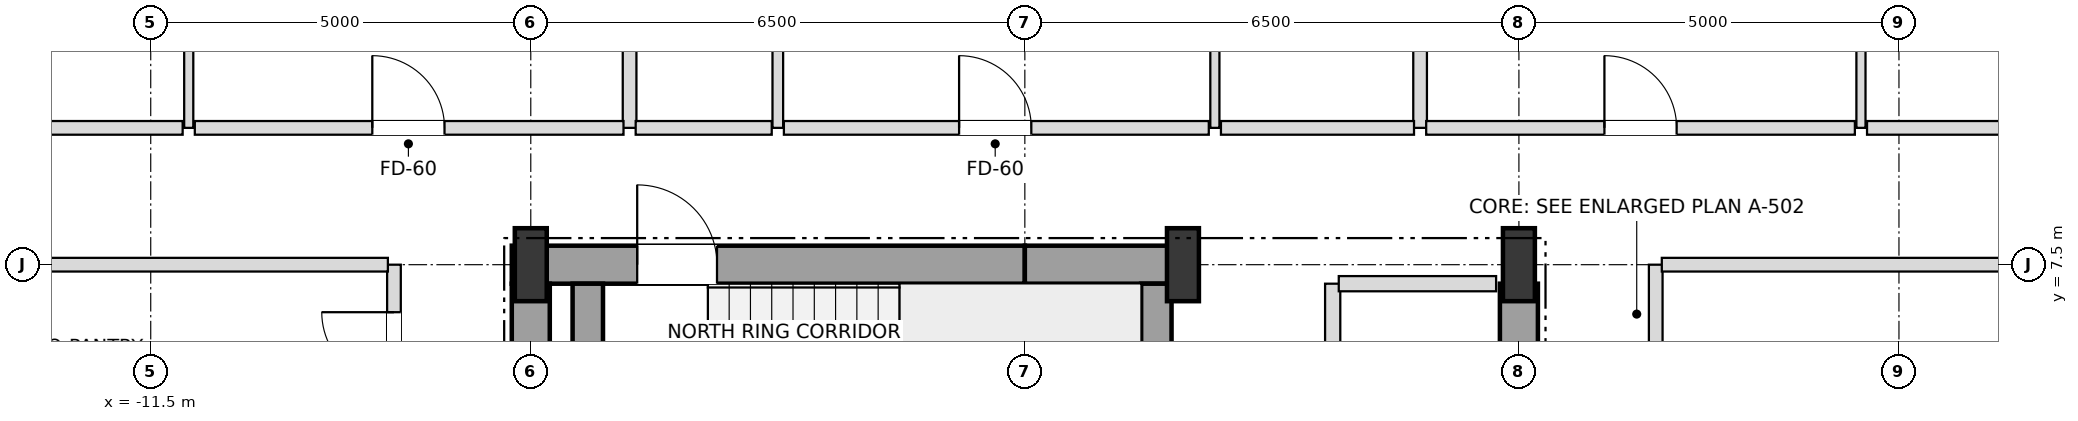
"""IFC4 building model, lengths in metres.
Left out: names, types, materials, properties, quantities, classifications, styles, units other than length and angle.
Written with IfcOpenShell. Run it as: python <this file> out.ifc"""

import sys

from ifc_helpers import new_model, si_unit, direction, frame, frame_2d, origin, origin_2d, place, context, subcontext, project, spatial, rectangle, i_section, extrude, element, fill, save


model = new_model("IFC4")
c1 = context("Model", 3, precision=1e-05, world=origin(), true_north=direction((0.0, 1.0)))
c2 = subcontext(c1, "Body", "Model", "MODEL_VIEW")
j1 = project(units=[si_unit("LENGTHUNIT", "METRE"), si_unit("PLANEANGLEUNIT", "RADIAN")], contexts=[c1])
p1 = place(None, origin())
s1 = spatial("IfcSite", under=j1, at=p1, CompositionType="ELEMENT")
p2 = place(p1, origin())
s2 = spatial("IfcBuilding", under=s1, at=p2, CompositionType="ELEMENT")
p3 = place(p2, frame((0.0, 0.0, 109.8)))
s3 = spatial("IfcBuildingStorey", under=s2, at=p3, CompositionType="ELEMENT", Elevation=109.8)
for number, where, z_axis, x_axis in (
    (1, (-6.5, 7.5, 0.0), (0.0, 0.0, 1.0), (1.0, 0.0, 0.0)),
    (2, (2.08, 7.5, 0.0), (0.0, 0.0, 1.0), (1.0, 0.0, 0.0)),
    (3, (6.5, 7.5, 0.0), (0.0, 0.0, 1.0), (1.0, 0.0, 0.0)),
):
    element("IfcColumn", number, at=place(p3, frame(where, z_axis=z_axis, x_axis=x_axis)), inside=s3, PredefinedType="COLUMN", context=c2, shape_type="SweptSolid", body=[
        extrude(i_section(OverallWidth=0.42, OverallDepth=0.96, WebThickness=0.022, FlangeThickness=0.034, at=origin_2d()), origin(), (0.0, 0.0, 1.0), 3.6),
    ])
p4 = place(p3, frame((-6.75, 7.5, 0.0), z_axis=(0.0, 0.0, 1.0), x_axis=(1.0, 0.0, 0.0)))
e4 = element("IfcWall", 4, at=p4, inside=s3, PredefinedType="SHEAR", context=c2, shape_type="SweptSolid", body=[
    extrude(rectangle(XDim=6.75, YDim=0.5, at=frame_2d((3.375, 0.0))), origin(), (0.0, 0.0, 1.0), 3.38),
])
p5 = place(p4, frame((1.65, 0.0, 0.0)))
e5 = element("IfcOpeningElement", 5, at=p5, cuts=e4, PredefinedType="OPENING", context=c2, shape_type="SweptSolid", body=[
    extrude(rectangle(XDim=1.05, YDim=2.15, at=frame_2d((0.525, 1.075))), frame((0.0, 0.26, 0.0), z_axis=(0.0, -1.0, 0.0), x_axis=(1.0, 0.0, 0.0)), (0.0, 0.0, 1.0), 0.52),
])
p6 = place(p3, frame((0.0, 7.5, 0.0), z_axis=(0.0, 0.0, 1.0), x_axis=(1.0, 0.0, 0.0)))
e6 = element("IfcWall", 6, at=p6, inside=s3, PredefinedType="SHEAR", context=c2, shape_type="SweptSolid", body=[
    extrude(rectangle(XDim=2.08, YDim=0.5, at=frame_2d((1.04, 0.0))), origin(), (0.0, 0.0, 1.0), 3.38),
])
for number, where, z_axis, x_axis in (
    (7, (-6.5, 3.95, 0.0), (0.0, 0.0, 1.0), (0.0, 1.0, 0.0)),
    (8, (6.5, 3.95, 0.0), (0.0, 0.0, 1.0), (0.0, 1.0, 0.0)),
):
    element("IfcWall", number, at=place(p3, frame(where, z_axis=z_axis, x_axis=x_axis)), inside=s3, PredefinedType="SHEAR", context=c2, shape_type="SweptSolid", body=[
        extrude(rectangle(XDim=3.3, YDim=0.5, at=frame_2d((1.65, 0.0))), origin(), (0.0, 0.0, 1.0), 3.38),
    ])
for number, where, z_axis, x_axis in (
    (9, (1.73, 3.95, 0.0), (0.0, 0.0, 1.0), (0.0, 1.0, 0.0)),
    (10, (-5.75, 3.95, 0.0), (0.0, 0.0, 1.0), (0.0, 1.0, 0.0)),
):
    element("IfcWall", number, at=place(p3, frame(where, z_axis=z_axis, x_axis=x_axis)), inside=s3, PredefinedType="SHEAR", context=c2, shape_type="SweptSolid", body=[
        extrude(rectangle(XDim=3.3, YDim=0.4, at=frame_2d((1.65, 0.0))), origin(), (0.0, 0.0, 1.0), 3.38),
    ])
p7 = place(p3, frame((-11.0, 9.3, 0.0), z_axis=(0.0, 0.0, 1.0), x_axis=(0.0, 1.0, 0.0)))
e11 = element("IfcWall", 11, at=p7, inside=s3, PredefinedType="PARTITIONING", context=c2, shape_type="SweptSolid", body=[
    extrude(rectangle(XDim=7.85, YDim=0.12, at=frame_2d((3.925, 0.0))), origin(), (0.0, 0.0, 1.0), 2.816),
])
p8 = place(p7, frame((4.219, 0.0, 0.0)))
e12 = element("IfcOpeningElement", 12, at=p8, cuts=e11, PredefinedType="OPENING", context=c2, shape_type="SweptSolid", body=[
    extrude(rectangle(XDim=0.95, YDim=2.1, at=frame_2d((0.475, 1.05))), frame((0.0, 0.07, 0.0), z_axis=(0.0, -1.0, 0.0), x_axis=(1.0, 0.0, 0.0)), (0.0, 0.0, 1.0), 0.14),
])
p9 = place(p3, frame((-8.3, -7.5, 0.0), z_axis=(0.0, 0.0, 1.0), x_axis=(0.0, 1.0, 0.0)))
e13 = element("IfcWall", 13, at=p9, inside=s3, PredefinedType="PARTITIONING", context=c2, shape_type="SweptSolid", body=[
    extrude(rectangle(XDim=15.0, YDim=0.18, at=frame_2d((7.5, 0.0))), origin(), (0.0, 0.0, 1.0), 3.38),
])
p10 = place(p9, frame((2.075, 0.0, 0.0)))
e14 = element("IfcOpeningElement", 14, at=p10, cuts=e13, PredefinedType="OPENING", context=c2, shape_type="SweptSolid", body=[
    extrude(rectangle(XDim=0.95, YDim=2.15, at=frame_2d((0.475, 1.075))), frame((0.0, 0.1, 0.0), z_axis=(0.0, -1.0, 0.0), x_axis=(1.0, 0.0, 0.0)), (0.0, 0.0, 1.0), 0.2),
])
p11 = place(p9, frame((8.475, 0.0, 0.0)))
e15 = element("IfcOpeningElement", 15, at=p11, cuts=e13, PredefinedType="OPENING", context=c2, shape_type="SweptSolid", body=[
    extrude(rectangle(XDim=0.95, YDim=2.15, at=frame_2d((0.475, 1.075))), frame((0.0, 0.1, 0.0), z_axis=(0.0, -1.0, 0.0), x_axis=(1.0, 0.0, 0.0)), (0.0, 0.0, 1.0), 0.2),
])
p12 = place(p9, frame((13.425, 0.0, 0.0)))
e16 = element("IfcOpeningElement", 16, at=p12, cuts=e13, PredefinedType="OPENING", context=c2, shape_type="SweptSolid", body=[
    extrude(rectangle(XDim=0.95, YDim=2.15, at=frame_2d((0.475, 1.075))), frame((0.0, 0.1, 0.0), z_axis=(0.0, -1.0, 0.0), x_axis=(1.0, 0.0, 0.0)), (0.0, 0.0, 1.0), 0.2),
])
p13 = place(p3, frame((-5.2, 9.3, 0.0), z_axis=(0.0, 0.0, 1.0), x_axis=(0.0, 1.0, 0.0)))
e17 = element("IfcWall", 17, at=p13, inside=s3, PredefinedType="PARTITIONING", context=c2, shape_type="SweptSolid", body=[
    extrude(rectangle(XDim=13.85, YDim=0.18, at=frame_2d((6.925, 0.0))), origin(), (0.0, 0.0, 1.0), 2.816),
])
p14 = place(p3, frame((-3.25, 9.3, 0.0), z_axis=(0.0, 0.0, 1.0), x_axis=(0.0, 1.0, 0.0)))
e18 = element("IfcWall", 18, at=p14, inside=s3, PredefinedType="PARTITIONING", context=c2, shape_type="SweptSolid", body=[
    extrude(rectangle(XDim=7.85, YDim=0.14, at=frame_2d((3.925, 0.0))), origin(), (0.0, 0.0, 1.0), 3.38),
])
p15 = place(p14, frame((3.47, 0.0, 0.0)))
e19 = element("IfcOpeningElement", 19, at=p15, cuts=e18, PredefinedType="OPENING", context=c2, shape_type="SweptSolid", body=[
    extrude(rectangle(XDim=0.9, YDim=2.1, at=frame_2d((0.45, 1.05))), frame((0.0, 0.08, 0.0), z_axis=(0.0, -1.0, 0.0), x_axis=(1.0, 0.0, 0.0)), (0.0, 0.0, 1.0), 0.16),
])
p16 = place(p3, frame((2.5, 9.3, 0.0), z_axis=(0.0, 0.0, 1.0), x_axis=(0.0, 1.0, 0.0)))
e20 = element("IfcWall", 20, at=p16, inside=s3, PredefinedType="PARTITIONING", context=c2, shape_type="SweptSolid", body=[
    extrude(rectangle(XDim=7.85, YDim=0.12, at=frame_2d((3.925, 0.0))), origin(), (0.0, 0.0, 1.0), 3.38),
])
p17 = place(p16, frame((3.445, 0.0, 0.0)))
e21 = element("IfcOpeningElement", 21, at=p17, cuts=e20, PredefinedType="OPENING", context=c2, shape_type="SweptSolid", body=[
    extrude(rectangle(XDim=0.95, YDim=2.1, at=frame_2d((0.475, 1.05))), frame((0.0, 0.07, 0.0), z_axis=(0.0, -1.0, 0.0), x_axis=(1.0, 0.0, 0.0)), (0.0, 0.0, 1.0), 0.14),
])
p18 = place(p3, frame((4.05, 4.2, 0.0), z_axis=(0.0, 0.0, 1.0), x_axis=(0.0, 1.0, 0.0)))
e22 = element("IfcWall", 22, at=p18, inside=s3, PredefinedType="SOLIDWALL", context=c2, shape_type="SweptSolid", body=[
    extrude(rectangle(XDim=3.05, YDim=0.2, at=frame_2d((1.525, 0.0))), origin(), (0.0, 0.0, 1.0), 3.38),
])
p19 = place(p18, frame((0.975, 0.0, 0.0)))
e23 = element("IfcOpeningElement", 23, at=p19, cuts=e22, PredefinedType="OPENING", context=c2, shape_type="SweptSolid", body=[
    extrude(rectangle(XDim=0.95, YDim=2.15, at=frame_2d((0.475, 1.075))), frame((0.0, 0.11, 0.0), z_axis=(0.0, -1.0, 0.0), x_axis=(1.0, 0.0, 0.0)), (0.0, 0.0, 1.0), 0.22),
])
p20 = place(p3, frame((5.2, 9.3, 0.0), z_axis=(0.0, 0.0, 1.0), x_axis=(0.0, 1.0, 0.0)))
e24 = element("IfcWall", 24, at=p20, inside=s3, PredefinedType="PARTITIONING", context=c2, shape_type="SweptSolid", body=[
    extrude(rectangle(XDim=13.85, YDim=0.18, at=frame_2d((6.925, 0.0))), origin(), (0.0, 0.0, 1.0), 2.816),
])
p21 = place(p3, frame((8.3, -7.5, 0.0), z_axis=(0.0, 0.0, 1.0), x_axis=(0.0, 1.0, 0.0)))
e25 = element("IfcWall", 25, at=p21, inside=s3, PredefinedType="PARTITIONING", context=c2, shape_type="SweptSolid", body=[
    extrude(rectangle(XDim=15.0, YDim=0.18, at=frame_2d((7.5, 0.0))), origin(), (0.0, 0.0, 1.0), 3.38),
])
p22 = place(p21, frame((3.475, 0.0, 0.0)))
e26 = element("IfcOpeningElement", 26, at=p22, cuts=e25, PredefinedType="OPENING", context=c2, shape_type="SweptSolid", body=[
    extrude(rectangle(XDim=0.95, YDim=2.15, at=frame_2d((0.475, 1.075))), frame((0.0, 0.1, 0.0), z_axis=(0.0, -1.0, 0.0), x_axis=(1.0, 0.0, 0.0)), (0.0, 0.0, 1.0), 0.2),
])
p23 = place(p3, frame((11.0, 9.3, 0.0), z_axis=(0.0, 0.0, 1.0), x_axis=(0.0, 1.0, 0.0)))
e27 = element("IfcWall", 27, at=p23, inside=s3, PredefinedType="PARTITIONING", context=c2, shape_type="SweptSolid", body=[
    extrude(rectangle(XDim=7.85, YDim=0.12, at=frame_2d((3.925, 0.0))), origin(), (0.0, 0.0, 1.0), 2.816),
])
p24 = place(p23, frame((4.219, 0.0, 0.0)))
e28 = element("IfcOpeningElement", 28, at=p24, cuts=e27, PredefinedType="OPENING", context=c2, shape_type="SweptSolid", body=[
    extrude(rectangle(XDim=0.95, YDim=2.1, at=frame_2d((0.475, 1.05))), frame((0.0, 0.07, 0.0), z_axis=(0.0, -1.0, 0.0), x_axis=(1.0, 0.0, 0.0)), (0.0, 0.0, 1.0), 0.14),
])
p25 = place(p3, frame((4.13, 7.25, 0.0), z_axis=(0.0, 0.0, 1.0), x_axis=(1.0, 0.0, 0.0)))
e29 = element("IfcWall", 29, at=p25, inside=s3, PredefinedType="SOLIDWALL", context=c2, shape_type="SweptSolid", body=[
    extrude(rectangle(XDim=2.07, YDim=0.2, at=frame_2d((1.035, 0.0))), origin(), (0.0, 0.0, 1.0), 3.38),
])
p26 = place(p3, frame((-20.15, 7.5, 0.0), z_axis=(0.0, 0.0, 1.0), x_axis=(1.0, 0.0, 0.0)))
e30 = element("IfcWall", 30, at=p26, inside=s3, PredefinedType="PARTITIONING", context=c2, shape_type="SweptSolid", body=[
    extrude(rectangle(XDim=11.77, YDim=0.18, at=frame_2d((5.885, 0.0))), origin(), (0.0, 0.0, 1.0), 2.816),
])
p27 = place(p3, frame((8.38, 7.5, 0.0), z_axis=(0.0, 0.0, 1.0), x_axis=(1.0, 0.0, 0.0)))
e31 = element("IfcWall", 31, at=p27, inside=s3, PredefinedType="PARTITIONING", context=c2, shape_type="SweptSolid", body=[
    extrude(rectangle(XDim=5.89, YDim=0.18, at=frame_2d((2.945, 0.0))), origin(), (0.0, 0.0, 1.0), 2.816),
])
p28 = place(p3, frame((-13.62, 9.3, 0.0), z_axis=(0.0, 0.0, 1.0), x_axis=(1.0, 0.0, 0.0)))
e32 = element("IfcWall", 32, at=p28, inside=s3, PredefinedType="PARTITIONING", context=c2, shape_type="SweptSolid", body=[
    extrude(rectangle(XDim=2.54, YDim=0.18, at=frame_2d((1.27, 0.0))), origin(), (0.0, 0.0, 1.0), 3.38),
])
p29 = place(p3, frame((-10.92, 9.3, 0.0), z_axis=(0.0, 0.0, 1.0), x_axis=(1.0, 0.0, 0.0)))
e33 = element("IfcWall", 33, at=p29, inside=s3, PredefinedType="PARTITIONING", context=c2, shape_type="SweptSolid", body=[
    extrude(rectangle(XDim=5.64, YDim=0.18, at=frame_2d((2.82, 0.0))), origin(), (0.0, 0.0, 1.0), 2.816),
])
p30 = place(p29, frame((2.335, 0.0, 0.0)))
e34 = element("IfcOpeningElement", 34, at=p30, cuts=e33, PredefinedType="OPENING", context=c2, shape_type="SweptSolid", body=[
    extrude(rectangle(XDim=0.95, YDim=2.15, at=frame_2d((0.475, 1.075))), frame((0.0, 0.1, 0.0), z_axis=(0.0, -1.0, 0.0), x_axis=(1.0, 0.0, 0.0)), (0.0, 0.0, 1.0), 0.2),
])
p31 = place(p3, frame((-5.12, 9.3, 0.0), z_axis=(0.0, 0.0, 1.0), x_axis=(1.0, 0.0, 0.0)))
e35 = element("IfcWall", 35, at=p31, inside=s3, PredefinedType="PARTITIONING", context=c2, shape_type="SweptSolid", body=[
    extrude(rectangle(XDim=1.79, YDim=0.18, at=frame_2d((0.895, 0.0))), origin(), (0.0, 0.0, 1.0), 3.38),
])
p32 = place(p3, frame((-3.17, 9.3, 0.0), z_axis=(0.0, 0.0, 1.0), x_axis=(1.0, 0.0, 0.0)))
e36 = element("IfcWall", 36, at=p32, inside=s3, PredefinedType="PARTITIONING", context=c2, shape_type="SweptSolid", body=[
    extrude(rectangle(XDim=5.59, YDim=0.18, at=frame_2d((2.795, 0.0))), origin(), (0.0, 0.0, 1.0), 3.38),
])
p33 = place(p32, frame((2.305, 0.0, 0.0)))
e37 = element("IfcOpeningElement", 37, at=p33, cuts=e36, PredefinedType="OPENING", context=c2, shape_type="SweptSolid", body=[
    extrude(rectangle(XDim=0.95, YDim=2.15, at=frame_2d((0.475, 1.075))), frame((0.0, 0.1, 0.0), z_axis=(0.0, -1.0, 0.0), x_axis=(1.0, 0.0, 0.0)), (0.0, 0.0, 1.0), 0.2),
])
p34 = place(p3, frame((2.58, 9.3, 0.0), z_axis=(0.0, 0.0, 1.0), x_axis=(1.0, 0.0, 0.0)))
e38 = element("IfcWall", 38, at=p34, inside=s3, PredefinedType="PARTITIONING", context=c2, shape_type="SweptSolid", body=[
    extrude(rectangle(XDim=2.54, YDim=0.18, at=frame_2d((1.27, 0.0))), origin(), (0.0, 0.0, 1.0), 3.38),
])
p35 = place(p3, frame((5.28, 9.3, 0.0), z_axis=(0.0, 0.0, 1.0), x_axis=(1.0, 0.0, 0.0)))
e39 = element("IfcWall", 39, at=p35, inside=s3, PredefinedType="PARTITIONING", context=c2, shape_type="SweptSolid", body=[
    extrude(rectangle(XDim=5.64, YDim=0.18, at=frame_2d((2.82, 0.0))), origin(), (0.0, 0.0, 1.0), 2.816),
])
p36 = place(p35, frame((2.345, 0.0, 0.0)))
e40 = element("IfcOpeningElement", 40, at=p36, cuts=e39, PredefinedType="OPENING", context=c2, shape_type="SweptSolid", body=[
    extrude(rectangle(XDim=0.95, YDim=2.15, at=frame_2d((0.475, 1.075))), frame((0.0, 0.1, 0.0), z_axis=(0.0, -1.0, 0.0), x_axis=(1.0, 0.0, 0.0)), (0.0, 0.0, 1.0), 0.2),
])
p37 = place(p3, frame((11.08, 9.3, 0.0), z_axis=(0.0, 0.0, 1.0), x_axis=(1.0, 0.0, 0.0)))
e41 = element("IfcWall", 41, at=p37, inside=s3, PredefinedType="PARTITIONING", context=c2, shape_type="SweptSolid", body=[
    extrude(rectangle(XDim=2.54, YDim=0.18, at=frame_2d((1.27, 0.0))), origin(), (0.0, 0.0, 1.0), 3.38),
])
p38 = place(p5, origin())
e42 = element("IfcDoor", 42, at=p38, inside=s3, OperationType="SINGLE_SWING_LEFT", PredefinedType="DOOR", context=c2, shape_type="SweptSolid", body=[
    extrude(rectangle(XDim=1.05, YDim=2.15, at=frame_2d((0.525, 1.075))), frame((0.0, 0.025, 0.0), z_axis=(0.0, -1.0, 0.0), x_axis=(1.0, 0.0, 0.0)), (0.0, 0.0, 1.0), 0.05),
])
fill(e5, e42)
p39 = place(p30, origin())
e43 = element("IfcDoor", 43, at=p39, inside=s3, OperationType="SINGLE_SWING_LEFT", PredefinedType="DOOR", context=c2, shape_type="SweptSolid", body=[
    extrude(rectangle(XDim=0.95, YDim=2.15, at=frame_2d((0.475, 1.075))), frame((0.0, 0.025, 0.0), z_axis=(0.0, -1.0, 0.0), x_axis=(1.0, 0.0, 0.0)), (0.0, 0.0, 1.0), 0.05),
])
fill(e34, e43)
p40 = place(p33, origin())
e44 = element("IfcDoor", 44, at=p40, inside=s3, OperationType="SINGLE_SWING_LEFT", PredefinedType="DOOR", context=c2, shape_type="SweptSolid", body=[
    extrude(rectangle(XDim=0.95, YDim=2.15, at=frame_2d((0.475, 1.075))), frame((0.0, 0.025, 0.0), z_axis=(0.0, -1.0, 0.0), x_axis=(1.0, 0.0, 0.0)), (0.0, 0.0, 1.0), 0.05),
])
fill(e37, e44)
p41 = place(p36, origin())
e45 = element("IfcDoor", 45, at=p41, inside=s3, OperationType="SINGLE_SWING_LEFT", PredefinedType="DOOR", context=c2, shape_type="SweptSolid", body=[
    extrude(rectangle(XDim=0.95, YDim=2.15, at=frame_2d((0.475, 1.075))), frame((0.0, 0.025, 0.0), z_axis=(0.0, -1.0, 0.0), x_axis=(1.0, 0.0, 0.0)), (0.0, 0.0, 1.0), 0.05),
])
fill(e40, e45)
p42 = place(p12, origin())
e46 = element("IfcDoor", 46, at=p42, inside=s3, OperationType="SINGLE_SWING_RIGHT", PredefinedType="DOOR", context=c2, shape_type="SweptSolid", body=[
    extrude(rectangle(XDim=0.95, YDim=2.15, at=frame_2d((0.475, 1.075))), frame((0.0, 0.025, 0.0), z_axis=(0.0, -1.0, 0.0), x_axis=(1.0, 0.0, 0.0)), (0.0, 0.0, 1.0), 0.05),
])
fill(e16, e46)
save(model, sys.argv[1])
